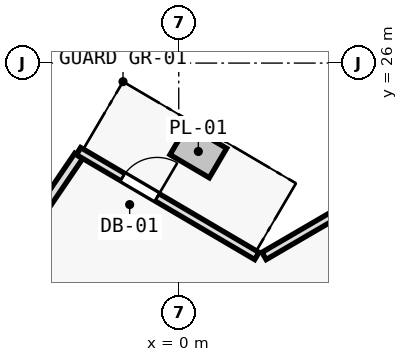
"""IFC4 building model, lengths in metres.
Left out: names, types, materials, properties, quantities, classifications, styles, units other than length and angle.
Written with IfcOpenShell. Run it as: python <this file> out.ifc"""

import sys

from ifc_helpers import new_model, si_unit, direction, frame, frame_2d, origin, place, context, subcontext, project, spatial, rectangle, extrude, element, fill, save


model = new_model("IFC4")
c1 = context("Model", 3, precision=1e-05, world=origin(), true_north=direction((0.0, 1.0)))
c2 = subcontext(c1, "Body", "Model", "MODEL_VIEW")
j1 = project(units=[si_unit("LENGTHUNIT", "METRE"), si_unit("PLANEANGLEUNIT", "RADIAN")], contexts=[c1])
p1 = place(None, origin())
s1 = spatial("IfcSite", under=j1, at=p1, CompositionType="ELEMENT")
p2 = place(p1, origin())
s2 = spatial("IfcBuilding", under=s1, at=p2, CompositionType="ELEMENT")
p3 = place(p2, frame((0.0, 0.0, 44.4)))
s3 = spatial("IfcBuildingStorey", under=s2, at=p3, CompositionType="ELEMENT", Elevation=44.4)
p4 = place(p3, frame((-9.684, 13.191, 0.0), z_axis=(0.0, 0.0, 1.0), x_axis=(0.562473549685, 0.826815279192, 0.0)))
e1 = element("IfcWall", 1, at=p4, inside=s3, PredefinedType="SOLIDWALL", context=c2, shape_type="SweptSolid", body=[
    extrude(rectangle(XDim=12.536, YDim=0.25, at=frame_2d((6.268, 0.0))), origin(), (0.0, 0.0, 1.0), 3.35),
])
p5 = place(p4, frame((5.818, 0.0, 0.62)))
e2 = element("IfcOpeningElement", 2, at=p5, cuts=e1, PredefinedType="OPENING", context=c2, shape_type="SweptSolid", body=[
    extrude(rectangle(XDim=0.9, YDim=1.6, at=frame_2d((0.45, 0.8))), frame((0.0, 0.135, 0.0), z_axis=(0.0, -1.0, 0.0), x_axis=(1.0, 0.0, 0.0)), (0.0, 0.0, 1.0), 0.27),
])
p6 = place(p3, frame((2.245, 20.925, 0.0), z_axis=(0.0, 0.0, 1.0), x_axis=(0.863967641515, 0.503547330858, 0.0)))
e3 = element("IfcWall", 3, at=p6, inside=s3, PredefinedType="SOLIDWALL", context=c2, shape_type="SweptSolid", body=[
    extrude(rectangle(XDim=4.925, YDim=0.22, at=frame_2d((2.462, 0.0))), origin(), (0.0, 0.0, 1.0), 3.35),
])
p7 = place(p3, frame((-2.635, 23.681, 0.0), z_axis=(0.0, 0.0, 1.0), x_axis=(0.862126841454, -0.506692519428, 0.0)))
e4 = element("IfcWall", 4, at=p7, inside=s3, PredefinedType="SOLIDWALL", context=c2, shape_type="SweptSolid", body=[
    extrude(rectangle(XDim=5.439, YDim=0.22, at=frame_2d((2.72, 0.0))), origin(), (0.0, 0.0, 1.0), 3.35),
])
p8 = place(p7, frame((1.345, 0.0, 0.0)))
e5 = element("IfcOpeningElement", 5, at=p8, cuts=e4, PredefinedType="OPENING", context=c2, shape_type="SweptSolid", body=[
    extrude(rectangle(XDim=1.05, YDim=2.15, at=frame_2d((0.525, 1.075))), frame((0.0, 0.12, 0.0), z_axis=(0.0, -1.0, 0.0), x_axis=(1.0, 0.0, 0.0)), (0.0, 0.0, 1.0), 0.24),
])
p9 = place(p8, origin())
e6 = element("IfcDoor", 6, at=p9, inside=s3, OperationType="SINGLE_SWING_RIGHT", PredefinedType="DOOR", context=c2, shape_type="SweptSolid", body=[
    extrude(rectangle(XDim=1.05, YDim=2.15, at=frame_2d((0.525, 1.075))), frame((0.0, 0.025, 0.0), z_axis=(0.0, -1.0, 0.0), x_axis=(1.0, 0.0, 0.0)), (0.0, 0.0, 1.0), 0.05),
])
fill(e5, e6)
save(model, sys.argv[1])
